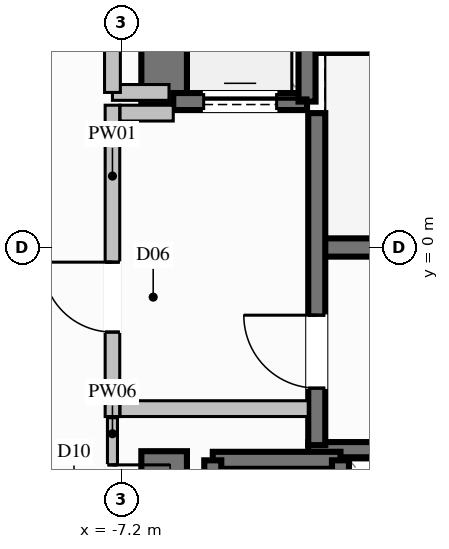
"""IFC4 building model, lengths in metres.
Left out: names, types, materials, properties, quantities, classifications, styles, units other than length and angle.
Written with IfcOpenShell. Run it as: python <this file> out.ifc"""

import sys

from ifc_helpers import new_model, si_unit, direction, frame, frame_2d, origin, place, context, subcontext, project, spatial, rectangle, extrude, element, fill, save


model = new_model("IFC4")
c1 = context("Model", 3, precision=1e-05, world=origin(), true_north=direction((0.0, 1.0)))
c2 = subcontext(c1, "Body", "Model", "MODEL_VIEW")
j1 = project(units=[si_unit("LENGTHUNIT", "METRE"), si_unit("PLANEANGLEUNIT", "RADIAN")], contexts=[c1])
p1 = place(None, origin())
s1 = spatial("IfcSite", under=j1, at=p1, CompositionType="ELEMENT")
p2 = place(p1, origin())
s2 = spatial("IfcBuilding", under=s1, at=p2, CompositionType="ELEMENT")
p3 = place(p2, frame((0.0, 0.0, 82.4)))
s3 = spatial("IfcBuildingStorey", under=s2, at=p3, CompositionType="ELEMENT", Elevation=82.4)
p4 = place(p3, frame((-3.99, 0.0, 0.0), z_axis=(0.0, 0.0, 1.0), x_axis=(1.0, 0.0, 0.0)))
e1 = element("IfcWall", 1, at=p4, inside=s3, PredefinedType="SHEAR", context=c2, shape_type="SweptSolid", body=[
    extrude(rectangle(XDim=7.98, YDim=0.3, at=frame_2d((3.99, 0.0))), origin(), (0.0, 0.0, 1.0), 3.6),
])
for number, where, z_axis, x_axis in (
    (2, (-4.13, -3.325, 0.0), (0.0, 0.0, 1.0), (1.0, 0.0, 0.0)),
    (3, (-4.13, 3.325, 0.0), (0.0, 0.0, 1.0), (1.0, 0.0, 0.0)),
):
    element("IfcWall", number, at=place(p3, frame(where, z_axis=z_axis, x_axis=x_axis)), inside=s3, PredefinedType="SOLIDWALL", context=c2, shape_type="SweptSolid", body=[
        extrude(rectangle(XDim=8.26, YDim=0.25, at=frame_2d((4.13, 0.0))), origin(), (0.0, 0.0, 1.0), 3.6),
    ])
p5 = place(p3, frame((-6.5, 2.35, 0.0), z_axis=(0.0, 0.0, 1.0), x_axis=(0.0, 1.0, 0.0)))
e4 = element("IfcWall", 4, at=p5, inside=s3, PredefinedType="SHEAR", context=c2, shape_type="SweptSolid", body=[
    extrude(rectangle(XDim=4.125, YDim=0.75, at=frame_2d((2.062, 0.0))), origin(), (0.0, 0.0, 1.0), 3.6),
])
p6 = place(p3, frame((-6.5, -6.475, 0.0), z_axis=(0.0, 0.0, 1.0), x_axis=(0.0, 1.0, 0.0)))
e5 = element("IfcWall", 5, at=p6, inside=s3, PredefinedType="SHEAR", context=c2, shape_type="SweptSolid", body=[
    extrude(rectangle(XDim=3.125, YDim=0.75, at=frame_2d((1.562, 0.0))), origin(), (0.0, 0.0, 1.0), 3.6),
])
p7 = place(p3, frame((-3.6, -3.5, 0.0), z_axis=(0.0, 0.0, 1.0), x_axis=(-1.0, 0.0, 0.0)))
e6 = element("IfcWall", 6, at=p7, inside=s3, PredefinedType="SOLIDWALL", context=c2, shape_type="SweptSolid", body=[
    extrude(rectangle(XDim=2.1, YDim=0.28, at=frame_2d((1.05, 0.0))), origin(), (0.0, 0.0, 1.0), 3.34),
])
for number, where, z_axis, x_axis in (
    (7, (-5.7, -3.5, 0.0), (0.0, 0.0, 1.0), (0.0, -1.0, 0.0)),
    (8, (-3.6, -6.0, 0.0), (0.0, 0.0, 1.0), (0.0, 1.0, 0.0)),
):
    element("IfcWall", number, at=place(p3, frame(where, z_axis=z_axis, x_axis=x_axis)), inside=s3, PredefinedType="SOLIDWALL", context=c2, shape_type="SweptSolid", body=[
        extrude(rectangle(XDim=2.5, YDim=0.28, at=frame_2d((1.25, 0.0))), origin(), (0.0, 0.0, 1.0), 3.34),
    ])
p8 = place(p3, frame((-6.35, 2.4, 0.0), z_axis=(0.0, 0.0, 1.0), x_axis=(1.0, 0.0, 0.0)))
e9 = element("IfcWall", 9, at=p8, inside=s3, PredefinedType="SOLIDWALL", context=c2, shape_type="SweptSolid", body=[
    extrude(rectangle(XDim=2.2, YDim=0.28, at=frame_2d((1.1, 0.0))), origin(), (0.0, 0.0, 1.0), 3.34),
])
p9 = place(p8, frame((0.5, 0.0, 0.0)))
e10 = element("IfcOpeningElement", 10, at=p9, cuts=e9, PredefinedType="OPENING", context=c2, shape_type="SweptSolid", body=[
    extrude(rectangle(XDim=1.2, YDim=2.2, at=frame_2d((0.6, 1.1))), frame((0.0, 0.15, 0.0), z_axis=(0.0, -1.0, 0.0), x_axis=(1.0, 0.0, 0.0)), (0.0, 0.0, 1.0), 0.3),
])
p10 = place(p3, frame((-4.15, 2.4, 0.0), z_axis=(0.0, 0.0, 1.0), x_axis=(0.0, 1.0, 0.0)))
e11 = element("IfcWall", 11, at=p10, inside=s3, PredefinedType="SOLIDWALL", context=c2, shape_type="SweptSolid", body=[
    extrude(rectangle(XDim=2.7, YDim=0.28, at=frame_2d((1.35, 0.0))), origin(), (0.0, 0.0, 1.0), 3.34),
])
p11 = place(p3, frame((-3.99, -3.25, 0.0), z_axis=(0.0, 0.0, 1.0), x_axis=(0.0, 1.0, 0.0)))
e12 = element("IfcWall", 12, at=p11, inside=s3, PredefinedType="SOLIDWALL", context=c2, shape_type="SweptSolid", body=[
    extrude(rectangle(XDim=5.46, YDim=0.28, at=frame_2d((2.73, 0.0))), origin(), (0.0, 0.0, 1.0), 3.34),
])
p12 = place(p11, frame((0.937, 0.0, 0.0)))
e13 = element("IfcOpeningElement", 13, at=p12, cuts=e12, PredefinedType="OPENING", context=c2, shape_type="SweptSolid", body=[
    extrude(rectangle(XDim=1.2, YDim=2.2, at=frame_2d((0.6, 1.1))), frame((0.0, 0.15, 0.0), z_axis=(0.0, -1.0, 0.0), x_axis=(1.0, 0.0, 0.0)), (0.0, 0.0, 1.0), 0.3),
])
p13 = place(p3, frame((-7.35, -2.78, 0.0), z_axis=(0.0, 0.0, 1.0), x_axis=(0.0, 1.0, 0.0)))
e14 = element("IfcWall", 14, at=p13, inside=s3, PredefinedType="PARTITIONING", context=c2, shape_type="SweptSolid", body=[
    extrude(rectangle(XDim=5.12, YDim=0.24, at=frame_2d((2.56, 0.0))), origin(), (0.0, 0.0, 1.0), 2.425),
])
p14 = place(p13, frame((1.389, 0.0, 0.0)))
e15 = element("IfcOpeningElement", 15, at=p14, cuts=e14, PredefinedType="OPENING", context=c2, shape_type="SweptSolid", body=[
    extrude(rectangle(XDim=1.15, YDim=2.2, at=frame_2d((0.575, 1.1))), frame((0.0, 0.13, 0.0), z_axis=(0.0, -1.0, 0.0), x_axis=(1.0, 0.0, 0.0)), (0.0, 0.0, 1.0), 0.26),
])
p15 = place(p3, frame((-7.225, -2.65, 0.0), z_axis=(0.0, 0.0, 1.0), x_axis=(1.0, 0.0, 0.0)))
e16 = element("IfcWall", 16, at=p15, inside=s3, PredefinedType="PARTITIONING", context=c2, shape_type="SweptSolid", body=[
    extrude(rectangle(XDim=3.095, YDim=0.26, at=frame_2d((1.548, 0.0))), origin(), (0.0, 0.0, 1.0), 3.34),
])
p16 = place(p3, frame((-7.225, 2.21, 0.0), z_axis=(0.0, 0.0, 1.0), x_axis=(1.0, 0.0, 0.0)))
e17 = element("IfcWall", 17, at=p16, inside=s3, PredefinedType="PARTITIONING", context=c2, shape_type="SweptSolid", body=[
    extrude(rectangle(XDim=0.875, YDim=0.26, at=frame_2d((0.438, 0.0))), origin(), (0.0, 0.0, 1.0), 3.34),
])
p17 = place(p3, frame((-7.35, 2.55, 0.0), z_axis=(0.0, 0.0, 1.0), x_axis=(1.0, 0.0, 0.0)))
e18 = element("IfcWall", 18, at=p17, inside=s3, PredefinedType="PARTITIONING", context=c2, shape_type="SweptSolid", body=[
    extrude(rectangle(XDim=0.93, YDim=0.26, at=frame_2d((0.465, 0.0))), origin(), (0.0, 0.0, 1.0), 3.34),
])
p18 = place(p3, frame((-7.35, 2.55, 0.0), z_axis=(0.0, 0.0, 1.0), x_axis=(0.0, 1.0, 0.0)))
e19 = element("IfcWall", 19, at=p18, inside=s3, PredefinedType="PARTITIONING", context=c2, shape_type="SweptSolid", body=[
    extrude(rectangle(XDim=2.4, YDim=0.26, at=frame_2d((1.2, 0.0))), origin(), (0.0, 0.0, 1.0), 2.425),
])
p19 = place(p18, frame((0.775, 0.0, 0.0)))
e20 = element("IfcOpeningElement", 20, at=p19, cuts=e19, PredefinedType="OPENING", context=c2, shape_type="SweptSolid", body=[
    extrude(rectangle(XDim=0.85, YDim=2.05, at=frame_2d((0.425, 1.025))), frame((0.0, 0.14, 0.0), z_axis=(0.0, -1.0, 0.0), x_axis=(1.0, 0.0, 0.0)), (0.0, 0.0, 1.0), 0.28),
])
p20 = place(p3, frame((-7.35, -2.8, 0.0), z_axis=(0.0, 0.0, 1.0), x_axis=(0.0, -1.0, 0.0)))
e21 = element("IfcWall", 21, at=p20, inside=s3, PredefinedType="PARTITIONING", context=c2, shape_type="SweptSolid", body=[
    extrude(rectangle(XDim=2.5, YDim=0.165, at=frame_2d((1.25, 0.0))), origin(), (0.0, 0.0, 1.0), 3.34),
])
p21 = place(p20, frame((0.775, 0.0, 0.0)))
e22 = element("IfcOpeningElement", 22, at=p21, cuts=e21, PredefinedType="OPENING", context=c2, shape_type="SweptSolid", body=[
    extrude(rectangle(XDim=0.95, YDim=2.1, at=frame_2d((0.475, 1.05))), frame((0.0, 0.093, 0.0), z_axis=(0.0, -1.0, 0.0), x_axis=(1.0, 0.0, 0.0)), (0.0, 0.0, 1.0), 0.185),
])
p22 = place(p9, origin())
e23 = element("IfcDoor", 23, at=p22, inside=s3, OperationType="SLIDING_TO_LEFT", PredefinedType="DOOR", context=c2, shape_type="SweptSolid", body=[
    extrude(rectangle(XDim=1.2, YDim=2.2, at=frame_2d((0.6, 1.1))), frame((0.0, 0.025, 0.0), z_axis=(0.0, -1.0, 0.0), x_axis=(1.0, 0.0, 0.0)), (0.0, 0.0, 1.0), 0.05),
])
fill(e10, e23)
p23 = place(p12, origin())
e24 = element("IfcDoor", 24, at=p23, inside=s3, OperationType="SINGLE_SWING_RIGHT", PredefinedType="DOOR", context=c2, shape_type="SweptSolid", body=[
    extrude(rectangle(XDim=1.2, YDim=2.2, at=frame_2d((0.6, 1.1))), frame((0.0, 0.025, 0.0), z_axis=(0.0, -1.0, 0.0), x_axis=(1.0, 0.0, 0.0)), (0.0, 0.0, 1.0), 0.05),
])
fill(e13, e24)
p24 = place(p14, origin())
e25 = element("IfcDoor", 25, at=p24, inside=s3, OperationType="SINGLE_SWING_RIGHT", PredefinedType="DOOR", context=c2, shape_type="SweptSolid", body=[
    extrude(rectangle(XDim=1.15, YDim=2.2, at=frame_2d((0.575, 1.1))), frame((0.0, 0.025, 0.0), z_axis=(0.0, -1.0, 0.0), x_axis=(1.0, 0.0, 0.0)), (0.0, 0.0, 1.0), 0.05),
])
fill(e15, e25)
p25 = place(p21, origin())
e26 = element("IfcDoor", 26, at=p25, inside=s3, OperationType="SINGLE_SWING_LEFT", PredefinedType="DOOR", context=c2, shape_type="SweptSolid", body=[
    extrude(rectangle(XDim=0.95, YDim=2.1, at=frame_2d((0.475, 1.05))), frame((0.0, 0.025, 0.0), z_axis=(0.0, -1.0, 0.0), x_axis=(1.0, 0.0, 0.0)), (0.0, 0.0, 1.0), 0.05),
])
fill(e22, e26)
save(model, sys.argv[1])
